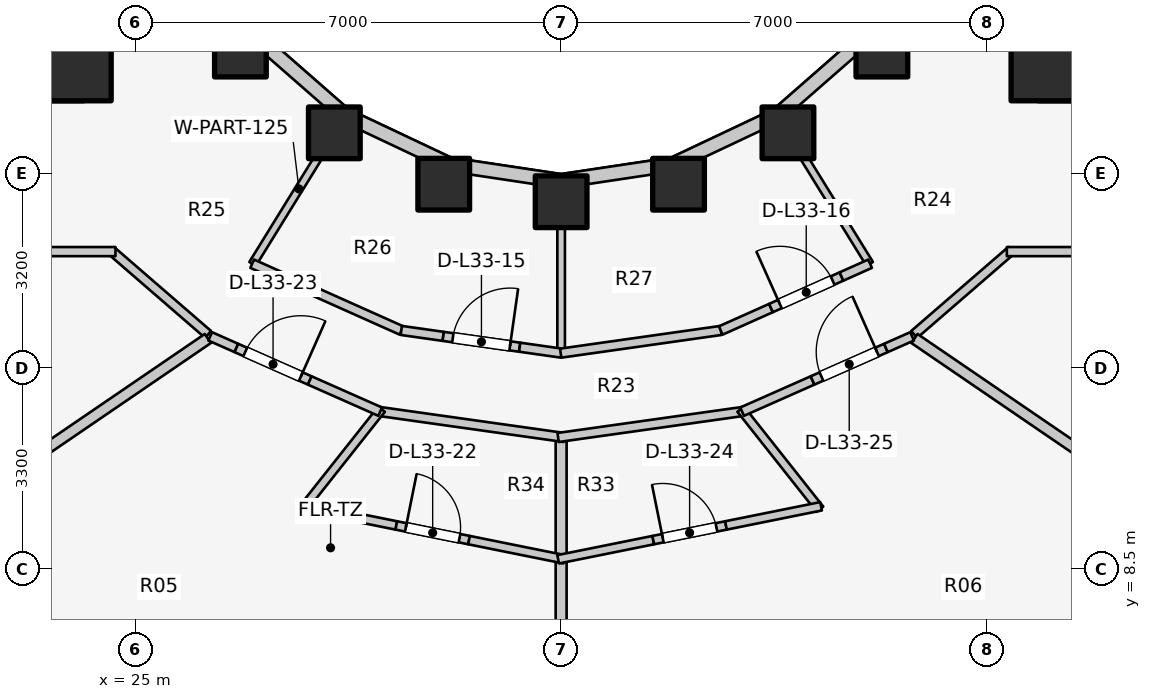
"""IFC4 building model, lengths in metres.
Left out: names, types, materials, properties, quantities, classifications, styles, units other than length and angle.
Written with IfcOpenShell. Run it as: python <this file> out.ifc"""

import sys

from ifc_helpers import new_model, si_unit, direction, frame, frame_2d, origin, origin_2d, place, context, subcontext, project, spatial, rectangle, extrude, element, fill, save


model = new_model("IFC4")
c1 = context("Model", 3, precision=1e-05, world=origin(), true_north=direction((0.0, 1.0)))
c2 = subcontext(c1, "Body", "Model", "MODEL_VIEW")
j1 = project(units=[si_unit("LENGTHUNIT", "METRE"), si_unit("PLANEANGLEUNIT", "RADIAN")], contexts=[c1])
p1 = place(None, origin())
s1 = spatial("IfcSite", under=j1, at=p1, CompositionType="ELEMENT")
p2 = place(p1, origin())
s2 = spatial("IfcBuilding", under=s1, at=p2, CompositionType="ELEMENT")
p3 = place(p2, frame((0.0, 0.0, 110.4)))
s3 = spatial("IfcBuildingStorey", under=s2, at=p3, CompositionType="ELEMENT", Elevation=110.4)
for number, where, z_axis, x_axis in (
    (1, (19.65, 16.55, 0.0), (0.0, 0.0, 1.0), (1.0, 0.0, 0.0)),
    (2, (39.85, 16.55, 0.0), (0.0, 0.0, 1.0), (1.0, 0.0, 0.0)),
):
    element("IfcWall", number, at=place(p3, frame(where, z_axis=z_axis, x_axis=x_axis)), inside=s3, PredefinedType="SHEAR", context=c2, shape_type="SweptSolid", body=[
        extrude(rectangle(XDim=4.5, YDim=0.7, at=frame_2d((2.25, 0.0))), origin(), (0.0, 0.0, 1.0), 3.1),
    ])
for number, where, z_axis, x_axis in (
    (3, (23.9, 16.9, 0.0), (0.0, 0.0, 1.0), (1.0, 0.0, 0.0)),
    (4, (40.1, 16.9, 0.0), (0.0, 0.0, 1.0), (1.0, 0.0, 0.0)),
):
    element("IfcColumn", number, at=place(p3, frame(where, z_axis=z_axis, x_axis=x_axis)), inside=s3, PredefinedType="COLUMN", context=c2, shape_type="SweptSolid", body=[
        extrude(rectangle(XDim=1.4, YDim=1.4, at=origin_2d()), origin(), (0.0, 0.0, 1.0), 3.1),
    ])
for number, where, z_axis, x_axis in (
    (5, (26.725, 17.018, 0.0), (0.0, 0.0, 1.0), (1.0, 0.0, 0.0)),
    (6, (28.27, 15.673, 0.0), (0.0, 0.0, 1.0), (1.0, 0.0, 0.0)),
    (7, (30.069, 14.828, 0.0), (0.0, 0.0, 1.0), (1.0, 0.0, 0.0)),
    (8, (32.0, 14.54, 0.0), (0.0, 0.0, 1.0), (1.0, 0.0, 0.0)),
    (9, (33.931, 14.828, 0.0), (0.0, 0.0, 1.0), (1.0, 0.0, 0.0)),
    (10, (35.73, 15.673, 0.0), (0.0, 0.0, 1.0), (1.0, 0.0, 0.0)),
    (11, (37.275, 17.018, 0.0), (0.0, 0.0, 1.0), (1.0, 0.0, 0.0)),
):
    element("IfcColumn", number, at=place(p3, frame(where, z_axis=z_axis, x_axis=x_axis)), inside=s3, PredefinedType="COLUMN", context=c2, shape_type="SweptSolid", body=[
        extrude(rectangle(XDim=0.85, YDim=0.85, at=origin_2d()), origin(), (0.0, 0.0, 1.0), 3.1),
    ])
p4 = place(p3, frame((26.965, 17.258, 0.0), z_axis=(0.0, 0.0, 1.0), x_axis=(0.752576694707, -0.658504607869, 0.0)))
e12 = element("IfcWall", 12, at=p4, inside=s3, PredefinedType="STANDARD", context=c2, shape_type="SweptSolid", body=[
    extrude(rectangle(XDim=1.959, YDim=0.23, at=frame_2d((0.98, 0.0))), origin(), (0.0, 0.0, 1.0), 1.22),
])
p5 = place(p3, frame((28.44, 15.968, 0.0), z_axis=(0.0, 0.0, 1.0), x_axis=(0.904179699603, -0.427152280606, 0.0)))
e13 = element("IfcWall", 13, at=p5, inside=s3, PredefinedType="STANDARD", context=c2, shape_type="SweptSolid", body=[
    extrude(rectangle(XDim=1.899, YDim=0.23, at=frame_2d((0.95, 0.0))), origin(), (0.0, 0.0, 1.0), 1.22),
])
for number, where, z_axis, x_axis in (
    (14, (30.157, 15.157, 0.0), (0.0, 0.0, 1.0), (0.989, -0.149, 0.0)),
    (15, (32.0, 14.88, 0.0), (0.0, 0.0, 1.0), (0.989, 0.149, 0.0)),
):
    element("IfcWall", number, at=place(p3, frame(where, z_axis=z_axis, x_axis=x_axis)), inside=s3, PredefinedType="STANDARD", context=c2, shape_type="SweptSolid", body=[
        extrude(rectangle(XDim=1.864, YDim=0.23, at=frame_2d((0.932, 0.0))), origin(), (0.0, 0.0, 1.0), 1.22),
    ])
p6 = place(p3, frame((33.843, 15.157, 0.0), z_axis=(0.0, 0.0, 1.0), x_axis=(0.904179699603, 0.427152280606, 0.0)))
e16 = element("IfcWall", 16, at=p6, inside=s3, PredefinedType="STANDARD", context=c2, shape_type="SweptSolid", body=[
    extrude(rectangle(XDim=1.899, YDim=0.23, at=frame_2d((0.95, 0.0))), origin(), (0.0, 0.0, 1.0), 1.22),
])
p7 = place(p3, frame((35.56, 15.968, 0.0), z_axis=(0.0, 0.0, 1.0), x_axis=(0.752576694707, 0.658504607869, 0.0)))
e17 = element("IfcWall", 17, at=p7, inside=s3, PredefinedType="STANDARD", context=c2, shape_type="SweptSolid", body=[
    extrude(rectangle(XDim=1.959, YDim=0.23, at=frame_2d((0.98, 0.0))), origin(), (0.0, 0.0, 1.0), 1.22),
])
p8 = place(p3, frame((26.193, 12.358, 0.0), z_axis=(0.0, 0.0, 1.0), x_axis=(-0.756055312247, 0.654507727092, 0.0)))
e18 = element("IfcWall", 18, at=p8, inside=s3, PredefinedType="PARTITIONING", context=c2, shape_type="SweptSolid", body=[
    extrude(rectangle(XDim=2.111, YDim=0.15, at=frame_2d((1.055, 0.0))), origin(), (0.0, 0.0, 1.0), 1.22),
])
p9 = place(p3, frame((19.51, 13.72, 0.0), z_axis=(0.0, 0.0, 1.0), x_axis=(1.0, 0.0, 0.0)))
e19 = element("IfcWall", 19, at=p9, inside=s3, PredefinedType="PARTITIONING", context=c2, shape_type="SweptSolid", body=[
    extrude(rectangle(XDim=5.16, YDim=0.15, at=frame_2d((2.58, 0.0))), origin(), (0.0, 0.0, 1.0), 1.22),
])
p10 = place(p3, frame((37.807, 12.358, 0.0), z_axis=(0.0, 0.0, 1.0), x_axis=(0.756055312247, 0.654507727092, 0.0)))
e20 = element("IfcWall", 20, at=p10, inside=s3, PredefinedType="PARTITIONING", context=c2, shape_type="SweptSolid", body=[
    extrude(rectangle(XDim=2.111, YDim=0.15, at=frame_2d((1.055, 0.0))), origin(), (0.0, 0.0, 1.0), 1.22),
])
p11 = place(p3, frame((39.33, 13.72, 0.0), z_axis=(0.0, 0.0, 1.0), x_axis=(1.0, 0.0, 0.0)))
e21 = element("IfcWall", 21, at=p11, inside=s3, PredefinedType="PARTITIONING", context=c2, shape_type="SweptSolid", body=[
    extrude(rectangle(XDim=5.06, YDim=0.15, at=frame_2d((2.53, 0.0))), origin(), (0.0, 0.0, 1.0), 1.22),
])
p12 = place(p3, frame((28.45, 15.985, 0.0), z_axis=(0.0, 0.0, 1.0), x_axis=(-0.525627246902, -0.850714991824, 0.0)))
e22 = element("IfcWall", 22, at=p12, inside=s3, PredefinedType="PARTITIONING", context=c2, shape_type="SweptSolid", body=[
    extrude(rectangle(XDim=2.901, YDim=0.125, at=frame_2d((1.451, 0.0))), origin(), (0.0, 0.0, 1.0), 1.22),
])
p13 = place(p3, frame((32.0, 14.9, 0.0), z_axis=(0.0, 0.0, 1.0), x_axis=(0.0, -1.0, 0.0)))
e23 = element("IfcWall", 23, at=p13, inside=s3, PredefinedType="PARTITIONING", context=c2, shape_type="SweptSolid", body=[
    extrude(rectangle(XDim=2.85, YDim=0.125, at=frame_2d((1.425, 0.0))), origin(), (0.0, 0.0, 1.0), 1.22),
])
p14 = place(p3, frame((35.55, 15.985, 0.0), z_axis=(0.0, 0.0, 1.0), x_axis=(0.525627246902, -0.850714991824, 0.0)))
e24 = element("IfcWall", 24, at=p14, inside=s3, PredefinedType="PARTITIONING", context=c2, shape_type="SweptSolid", body=[
    extrude(rectangle(XDim=2.901, YDim=0.125, at=frame_2d((1.451, 0.0))), origin(), (0.0, 0.0, 1.0), 1.22),
])
p15 = place(p3, frame((26.919, 13.521, 0.0), z_axis=(0.0, 0.0, 1.0), x_axis=(0.912888568324, -0.408208845842, 0.0)))
e25 = element("IfcWall", 25, at=p15, inside=s3, PredefinedType="PARTITIONING", context=c2, shape_type="SweptSolid", body=[
    extrude(rectangle(XDim=2.69, YDim=0.15, at=frame_2d((1.345, 0.0))), origin(), (0.0, 0.0, 1.0), 1.22),
])
p16 = place(p3, frame((29.371, 12.424, 0.0), z_axis=(0.0, 0.0, 1.0), x_axis=(0.990110185172, -0.1402919143, 0.0)))
e26 = element("IfcWall", 26, at=p16, inside=s3, PredefinedType="PARTITIONING", context=c2, shape_type="SweptSolid", body=[
    extrude(rectangle(XDim=0.696, YDim=0.15, at=frame_2d((0.348, 0.0))), origin(), (0.0, 0.0, 1.0), 2.575),
])
p17 = place(p3, frame((30.061, 12.326, 0.0), z_axis=(0.0, 0.0, 1.0), x_axis=(0.990102710588, -0.140344656064, 0.0)))
e27 = element("IfcWall", 27, at=p17, inside=s3, PredefinedType="PARTITIONING", context=c2, shape_type="SweptSolid", body=[
    extrude(rectangle(XDim=1.27, YDim=0.15, at=frame_2d((0.635, 0.0))), origin(), (0.0, 0.0, 1.0), 2.575),
])
p18 = place(p17, frame((0.16, 0.0, 0.0)))
e28 = element("IfcOpeningElement", 28, at=p18, cuts=e27, PredefinedType="OPENING", context=c2, shape_type="SweptSolid", body=[
    extrude(rectangle(XDim=0.95, YDim=2.1, at=frame_2d((0.475, 1.05))), frame((0.0, 0.085, 0.0), z_axis=(0.0, -1.0, 0.0), x_axis=(1.0, 0.0, 0.0)), (0.0, 0.0, 1.0), 0.17),
])
p19 = place(p3, frame((31.318, 12.148, 0.0), z_axis=(0.0, 0.0, 1.0), x_axis=(0.990110185172, -0.1402919143, 0.0)))
e29 = element("IfcWall", 29, at=p19, inside=s3, PredefinedType="PARTITIONING", context=c2, shape_type="SweptSolid", body=[
    extrude(rectangle(XDim=0.696, YDim=0.15, at=frame_2d((0.348, 0.0))), origin(), (0.0, 0.0, 1.0), 1.22),
])
p20 = place(p3, frame((31.993, 12.05, 0.0), z_axis=(0.0, 0.0, 1.0), x_axis=(0.990106619919, 0.140317073775, 0.0)))
e30 = element("IfcWall", 30, at=p20, inside=s3, PredefinedType="PARTITIONING", context=c2, shape_type="SweptSolid", body=[
    extrude(rectangle(XDim=2.662, YDim=0.15, at=frame_2d((1.331, 0.0))), origin(), (0.0, 0.0, 1.0), 1.22),
])
p21 = place(p3, frame((34.625, 12.423, 0.0), z_axis=(0.0, 0.0, 1.0), x_axis=(0.912863245368, 0.408265471546, 0.0)))
e31 = element("IfcWall", 31, at=p21, inside=s3, PredefinedType="PARTITIONING", context=c2, shape_type="SweptSolid", body=[
    extrude(rectangle(XDim=0.905, YDim=0.15, at=frame_2d((0.452, 0.0))), origin(), (0.0, 0.0, 1.0), 1.22),
])
p22 = place(p3, frame((35.451, 12.792, 0.0), z_axis=(0.0, 0.0, 1.0), x_axis=(0.91289745036, 0.408188982122, 0.0)))
e32 = element("IfcWall", 32, at=p22, inside=s3, PredefinedType="PARTITIONING", context=c2, shape_type="SweptSolid", body=[
    extrude(rectangle(XDim=1.27, YDim=0.15, at=frame_2d((0.635, 0.0))), origin(), (0.0, 0.0, 1.0), 2.16),
])
p23 = place(p22, frame((0.16, 0.0, 0.0)))
e33 = element("IfcOpeningElement", 33, at=p23, cuts=e32, PredefinedType="OPENING", context=c2, shape_type="SweptSolid", body=[
    extrude(rectangle(XDim=0.95, YDim=2.1, at=frame_2d((0.475, 1.05))), frame((0.0, 0.085, 0.0), z_axis=(0.0, -1.0, 0.0), x_axis=(1.0, 0.0, 0.0)), (0.0, 0.0, 1.0), 0.17),
])
p24 = place(p3, frame((36.61, 13.31, 0.0), z_axis=(0.0, 0.0, 1.0), x_axis=(0.912911125305, 0.40815839731, 0.0)))
e34 = element("IfcWall", 34, at=p24, inside=s3, PredefinedType="PARTITIONING", context=c2, shape_type="SweptSolid", body=[
    extrude(rectangle(XDim=0.516, YDim=0.15, at=frame_2d((0.258, 0.0))), origin(), (0.0, 0.0, 1.0), 2.575),
])
p25 = place(p3, frame((26.19, 12.291, 0.0), z_axis=(0.0, 0.0, 1.0), x_axis=(-0.825850521911, -0.563889098546, 0.0)))
e35 = element("IfcWall", 35, at=p25, inside=s3, PredefinedType="PARTITIONING", context=c2, shape_type="SweptSolid", body=[
    extrude(rectangle(XDim=8.228, YDim=0.18, at=frame_2d((4.114, 0.0))), origin(), (0.0, 0.0, 1.0), 1.22),
])
p26 = place(p3, frame((32.0, 10.615, 0.0), z_axis=(0.0, 0.0, 1.0), x_axis=(0.0, -1.0, 0.0)))
e36 = element("IfcWall", 36, at=p26, inside=s3, PredefinedType="PARTITIONING", context=c2, shape_type="SweptSolid", body=[
    extrude(rectangle(XDim=5.99, YDim=0.18, at=frame_2d((2.995, 0.0))), origin(), (0.0, 0.0, 1.0), 1.22),
])
p27 = place(p3, frame((37.81, 12.291, 0.0), z_axis=(0.0, 0.0, 1.0), x_axis=(0.825850521911, -0.563889098546, 0.0)))
e37 = element("IfcWall", 37, at=p27, inside=s3, PredefinedType="PARTITIONING", context=c2, shape_type="SweptSolid", body=[
    extrude(rectangle(XDim=8.228, YDim=0.18, at=frame_2d((4.114, 0.0))), origin(), (0.0, 0.0, 1.0), 1.22),
])
p28 = place(p3, frame((28.966, 11.097, 0.0), z_axis=(0.0, 0.0, 1.0), x_axis=(0.990234434447, -0.139412211929, 0.0)))
e38 = element("IfcWall", 38, at=p28, inside=s3, PredefinedType="PARTITIONING", context=c2, shape_type="SweptSolid", body=[
    extrude(rectangle(XDim=3.114, YDim=0.15, at=frame_2d((1.557, 0.0))), origin(), (0.0, 0.0, 1.0), 1.22),
])
p29 = place(p3, frame((29.047, 11.129, 0.0), z_axis=(0.0, 0.0, 1.0), x_axis=(-0.620702944366, -0.784045824462, 0.0)))
e39 = element("IfcWall", 39, at=p29, inside=s3, PredefinedType="PLUMBINGWALL", context=c2, shape_type="SweptSolid", body=[
    extrude(rectangle(XDim=2.1, YDim=0.14, at=frame_2d((1.05, 0.0))), origin(), (0.0, 0.0, 1.0), 2.105),
])
p30 = place(p3, frame((27.725, 9.532, 0.0), z_axis=(0.0, 0.0, 1.0), x_axis=(0.980261572321, -0.197704956516, 0.0)))
e40 = element("IfcWall", 40, at=p30, inside=s3, PredefinedType="PLUMBINGWALL", context=c2, shape_type="SweptSolid", body=[
    extrude(rectangle(XDim=1.595, YDim=0.14, at=frame_2d((0.798, 0.0))), origin(), (0.0, 0.0, 1.0), 2.575),
])
p31 = place(p3, frame((29.289, 9.217, 0.0), z_axis=(0.0, 0.0, 1.0), x_axis=(0.980256050043, -0.197732335125, 0.0)))
e41 = element("IfcWall", 41, at=p31, inside=s3, PredefinedType="PLUMBINGWALL", context=c2, shape_type="SweptSolid", body=[
    extrude(rectangle(XDim=1.22, YDim=0.14, at=frame_2d((0.61, 0.0))), origin(), (0.0, 0.0, 1.0), 2.575),
])
p32 = place(p31, frame((0.16, 0.0, 0.0)))
e42 = element("IfcOpeningElement", 42, at=p32, cuts=e41, PredefinedType="OPENING", context=c2, shape_type="SweptSolid", body=[
    extrude(rectangle(XDim=0.9, YDim=2.1, at=frame_2d((0.45, 1.05))), frame((0.0, 0.08, 0.0), z_axis=(0.0, -1.0, 0.0), x_axis=(1.0, 0.0, 0.0)), (0.0, 0.0, 1.0), 0.16),
])
p33 = place(p3, frame((30.485, 8.975, 0.0), z_axis=(0.0, 0.0, 1.0), x_axis=(0.980291218326, -0.197557908657, 0.0)))
e43 = element("IfcWall", 43, at=p33, inside=s3, PredefinedType="PLUMBINGWALL", context=c2, shape_type="SweptSolid", body=[
    extrude(rectangle(XDim=1.595, YDim=0.14, at=frame_2d((0.798, 0.0))), origin(), (0.0, 0.0, 1.0), 1.22),
])
p34 = place(p3, frame((26.228, 12.326, 0.0), z_axis=(0.0, 0.0, 1.0), x_axis=(0.914387769504, -0.404839482983, 0.0)))
e44 = element("IfcWall", 44, at=p34, inside=s3, PredefinedType="PARTITIONING", context=c2, shape_type="SweptSolid", body=[
    extrude(rectangle(XDim=0.471, YDim=0.15, at=frame_2d((0.235, 0.0))), origin(), (0.0, 0.0, 1.0), 2.575),
])
p35 = place(p3, frame((26.659, 12.135, 0.0), z_axis=(0.0, 0.0, 1.0), x_axis=(0.914314172667, -0.405005671145, 0.0)))
e45 = element("IfcWall", 45, at=p35, inside=s3, PredefinedType="PARTITIONING", context=c2, shape_type="SweptSolid", body=[
    extrude(rectangle(XDim=1.32, YDim=0.15, at=frame_2d((0.66, 0.0))), origin(), (0.0, 0.0, 1.0), 2.16),
])
p36 = place(p35, frame((0.16, 0.0, 0.0)))
e46 = element("IfcOpeningElement", 46, at=p36, cuts=e45, PredefinedType="OPENING", context=c2, shape_type="SweptSolid", body=[
    extrude(rectangle(XDim=1.0, YDim=2.1, at=frame_2d((0.5, 1.05))), frame((0.0, 0.085, 0.0), z_axis=(0.0, -1.0, 0.0), x_axis=(1.0, 0.0, 0.0)), (0.0, 0.0, 1.0), 0.17),
])
p37 = place(p3, frame((27.866, 11.601, 0.0), z_axis=(0.0, 0.0, 1.0), x_axis=(0.914311660367, -0.405011342701, 0.0)))
e47 = element("IfcWall", 47, at=p37, inside=s3, PredefinedType="PARTITIONING", context=c2, shape_type="SweptSolid", body=[
    extrude(rectangle(XDim=1.267, YDim=0.15, at=frame_2d((0.633, 0.0))), origin(), (0.0, 0.0, 1.0), 1.22),
])
p38 = place(p3, frame((31.95, 10.663, 0.0), z_axis=(0.0, 0.0, 1.0), x_axis=(0.990234434447, 0.139412211929, 0.0)))
e48 = element("IfcWall", 48, at=p38, inside=s3, PredefinedType="PARTITIONING", context=c2, shape_type="SweptSolid", body=[
    extrude(rectangle(XDim=3.114, YDim=0.15, at=frame_2d((1.557, 0.0))), origin(), (0.0, 0.0, 1.0), 1.22),
])
p39 = place(p3, frame((34.953, 11.129, 0.0), z_axis=(0.0, 0.0, 1.0), x_axis=(0.620702944366, -0.784045824462, 0.0)))
e49 = element("IfcWall", 49, at=p39, inside=s3, PredefinedType="PLUMBINGWALL", context=c2, shape_type="SweptSolid", body=[
    extrude(rectangle(XDim=2.1, YDim=0.14, at=frame_2d((1.05, 0.0))), origin(), (0.0, 0.0, 1.0), 2.105),
])
p40 = place(p3, frame((31.951, 8.66, 0.0), z_axis=(0.0, 0.0, 1.0), x_axis=(0.980291218326, 0.197557908657, 0.0)))
e50 = element("IfcWall", 50, at=p40, inside=s3, PredefinedType="PLUMBINGWALL", context=c2, shape_type="SweptSolid", body=[
    extrude(rectangle(XDim=1.595, YDim=0.14, at=frame_2d((0.798, 0.0))), origin(), (0.0, 0.0, 1.0), 1.22),
])
p41 = place(p3, frame((33.515, 8.975, 0.0), z_axis=(0.0, 0.0, 1.0), x_axis=(0.980256050043, 0.197732335125, 0.0)))
e51 = element("IfcWall", 51, at=p41, inside=s3, PredefinedType="PLUMBINGWALL", context=c2, shape_type="SweptSolid", body=[
    extrude(rectangle(XDim=1.22, YDim=0.14, at=frame_2d((0.61, 0.0))), origin(), (0.0, 0.0, 1.0), 2.575),
])
p42 = place(p41, frame((0.16, 0.0, 0.0)))
e52 = element("IfcOpeningElement", 52, at=p42, cuts=e51, PredefinedType="OPENING", context=c2, shape_type="SweptSolid", body=[
    extrude(rectangle(XDim=0.9, YDim=2.1, at=frame_2d((0.45, 1.05))), frame((0.0, 0.08, 0.0), z_axis=(0.0, -1.0, 0.0), x_axis=(1.0, 0.0, 0.0)), (0.0, 0.0, 1.0), 0.16),
])
p43 = place(p3, frame((34.711, 9.217, 0.0), z_axis=(0.0, 0.0, 1.0), x_axis=(0.980261572321, 0.197704956516, 0.0)))
e53 = element("IfcWall", 53, at=p43, inside=s3, PredefinedType="PLUMBINGWALL", context=c2, shape_type="SweptSolid", body=[
    extrude(rectangle(XDim=1.595, YDim=0.14, at=frame_2d((0.798, 0.0))), origin(), (0.0, 0.0, 1.0), 2.575),
])
p44 = place(p3, frame((34.976, 11.088, 0.0), z_axis=(0.0, 0.0, 1.0), x_axis=(0.914311660367, 0.405011342701, 0.0)))
e54 = element("IfcWall", 54, at=p44, inside=s3, PredefinedType="PARTITIONING", context=c2, shape_type="SweptSolid", body=[
    extrude(rectangle(XDim=1.267, YDim=0.15, at=frame_2d((0.633, 0.0))), origin(), (0.0, 0.0, 1.0), 1.22),
])
p45 = place(p3, frame((36.134, 11.601, 0.0), z_axis=(0.0, 0.0, 1.0), x_axis=(0.914314172667, 0.405005671145, 0.0)))
e55 = element("IfcWall", 55, at=p45, inside=s3, PredefinedType="PARTITIONING", context=c2, shape_type="SweptSolid", body=[
    extrude(rectangle(XDim=1.32, YDim=0.15, at=frame_2d((0.66, 0.0))), origin(), (0.0, 0.0, 1.0), 2.16),
])
p46 = place(p45, frame((0.16, 0.0, 0.0)))
e56 = element("IfcOpeningElement", 56, at=p46, cuts=e55, PredefinedType="OPENING", context=c2, shape_type="SweptSolid", body=[
    extrude(rectangle(XDim=1.0, YDim=2.1, at=frame_2d((0.5, 1.05))), frame((0.0, 0.085, 0.0), z_axis=(0.0, -1.0, 0.0), x_axis=(1.0, 0.0, 0.0)), (0.0, 0.0, 1.0), 0.17),
])
p47 = place(p3, frame((37.341, 12.135, 0.0), z_axis=(0.0, 0.0, 1.0), x_axis=(0.914387769504, 0.404839482983, 0.0)))
e57 = element("IfcWall", 57, at=p47, inside=s3, PredefinedType="PARTITIONING", context=c2, shape_type="SweptSolid", body=[
    extrude(rectangle(XDim=0.471, YDim=0.15, at=frame_2d((0.235, 0.0))), origin(), (0.0, 0.0, 1.0), 2.575),
])
p48 = place(p18, origin())
e58 = element("IfcDoor", 58, at=p48, inside=s3, OperationType="SINGLE_SWING_RIGHT", PredefinedType="DOOR", context=c2, shape_type="SweptSolid", body=[
    extrude(rectangle(XDim=0.95, YDim=2.1, at=frame_2d((0.475, 1.05))), frame((0.0, 0.025, 0.0), z_axis=(0.0, -1.0, 0.0), x_axis=(1.0, 0.0, 0.0)), (0.0, 0.0, 1.0), 0.05),
])
fill(e28, e58)
p49 = place(p23, origin())
e59 = element("IfcDoor", 59, at=p49, inside=s3, OperationType="SINGLE_SWING_LEFT", PredefinedType="DOOR", context=c2, shape_type="SweptSolid", body=[
    extrude(rectangle(XDim=0.95, YDim=2.1, at=frame_2d((0.475, 1.05))), frame((0.0, 0.025, 0.0), z_axis=(0.0, -1.0, 0.0), x_axis=(1.0, 0.0, 0.0)), (0.0, 0.0, 1.0), 0.05),
])
fill(e33, e59)
p50 = place(p32, origin())
e60 = element("IfcDoor", 60, at=p50, inside=s3, OperationType="SINGLE_SWING_LEFT", PredefinedType="DOOR", context=c2, shape_type="SweptSolid", body=[
    extrude(rectangle(XDim=0.9, YDim=2.1, at=frame_2d((0.45, 1.05))), frame((0.0, 0.025, 0.0), z_axis=(0.0, -1.0, 0.0), x_axis=(1.0, 0.0, 0.0)), (0.0, 0.0, 1.0), 0.05),
])
fill(e42, e60)
p51 = place(p36, origin())
e61 = element("IfcDoor", 61, at=p51, inside=s3, OperationType="SINGLE_SWING_RIGHT", PredefinedType="DOOR", context=c2, shape_type="SweptSolid", body=[
    extrude(rectangle(XDim=1.0, YDim=2.1, at=frame_2d((0.5, 1.05))), frame((0.0, 0.025, 0.0), z_axis=(0.0, -1.0, 0.0), x_axis=(1.0, 0.0, 0.0)), (0.0, 0.0, 1.0), 0.05),
])
fill(e46, e61)
p52 = place(p42, origin())
e62 = element("IfcDoor", 62, at=p52, inside=s3, OperationType="SINGLE_SWING_LEFT", PredefinedType="DOOR", context=c2, shape_type="SweptSolid", body=[
    extrude(rectangle(XDim=0.9, YDim=2.1, at=frame_2d((0.45, 1.05))), frame((0.0, 0.025, 0.0), z_axis=(0.0, -1.0, 0.0), x_axis=(1.0, 0.0, 0.0)), (0.0, 0.0, 1.0), 0.05),
])
fill(e52, e62)
p53 = place(p46, origin())
e63 = element("IfcDoor", 63, at=p53, inside=s3, OperationType="SINGLE_SWING_RIGHT", PredefinedType="DOOR", context=c2, shape_type="SweptSolid", body=[
    extrude(rectangle(XDim=1.0, YDim=2.1, at=frame_2d((0.5, 1.05))), frame((0.0, 0.025, 0.0), z_axis=(0.0, -1.0, 0.0), x_axis=(1.0, 0.0, 0.0)), (0.0, 0.0, 1.0), 0.05),
])
fill(e56, e63)
save(model, sys.argv[1])
